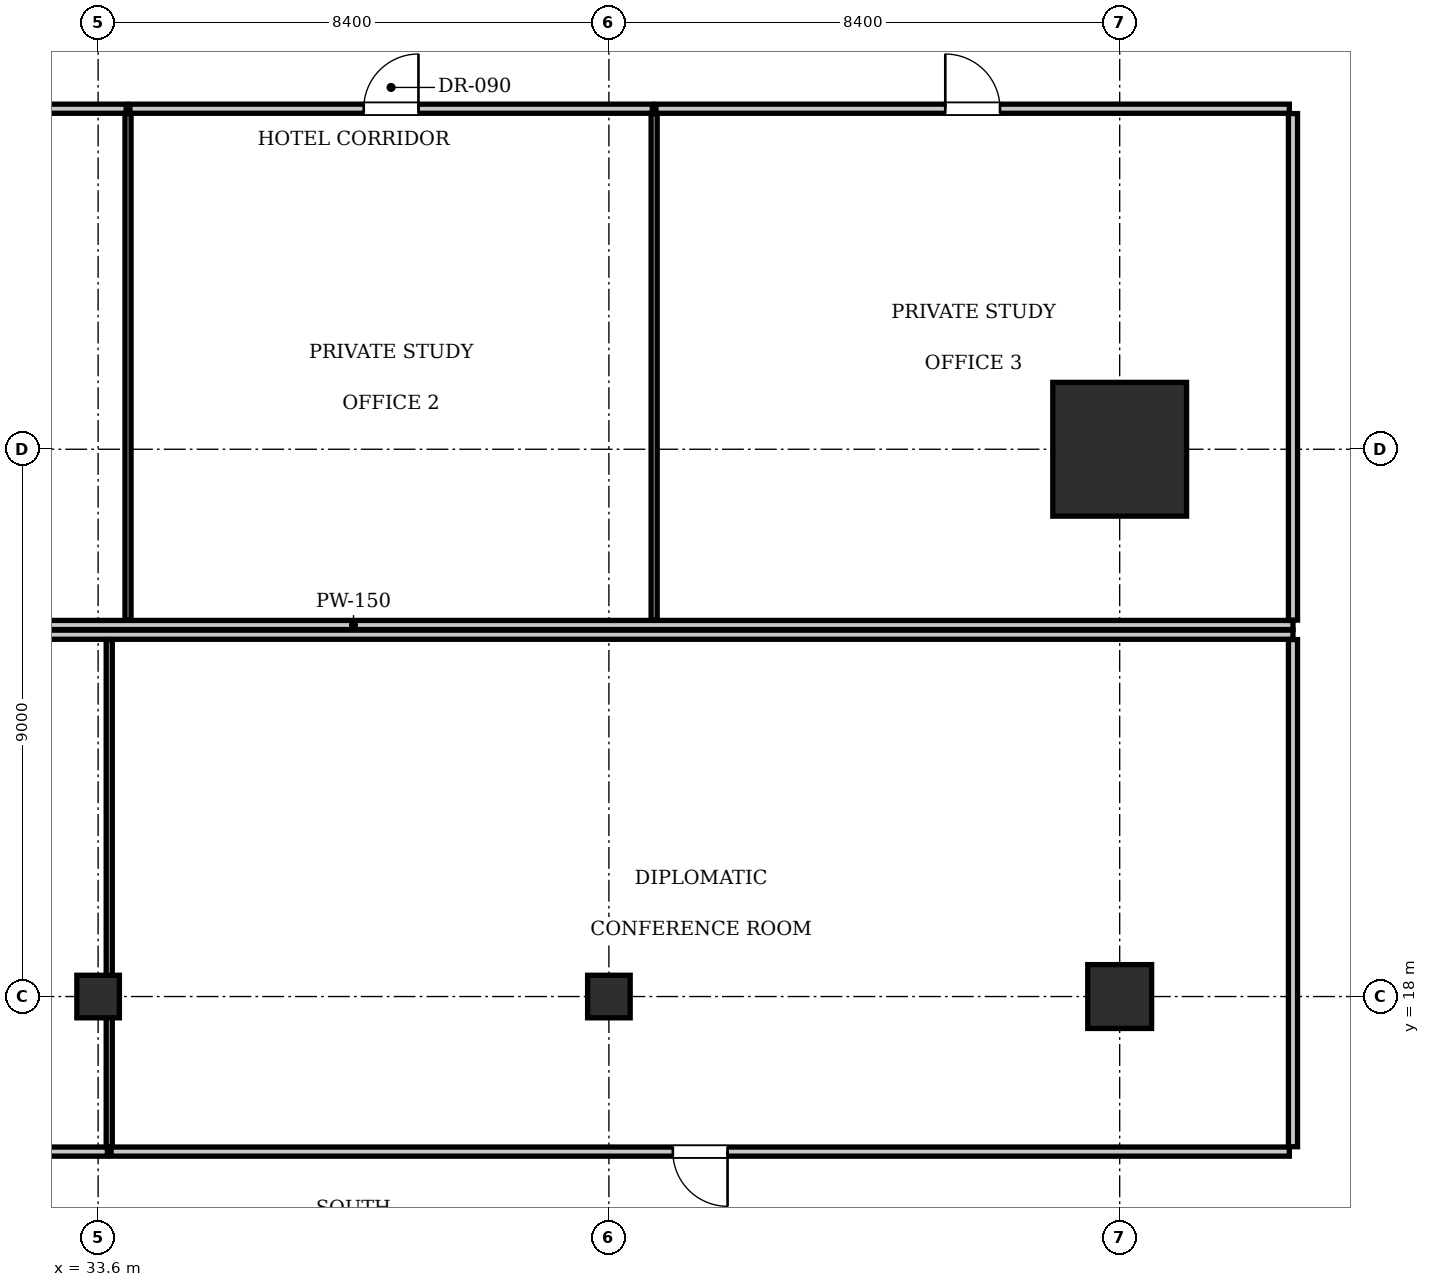
"""IFC4 building model, lengths in metres.
Left out: names, types, materials, properties, quantities, classifications, styles, units other than length and angle.
Written with IfcOpenShell. Run it as: python <this file> out.ifc"""

import sys

from ifc_helpers import new_model, si_unit, direction, frame, frame_2d, origin, origin_2d, place, context, subcontext, project, spatial, rectangle, i_section, extrude, element, fill, save


model = new_model("IFC4")
c1 = context("Model", 3, precision=1e-05, world=origin(), true_north=direction((0.0, 1.0)))
c2 = subcontext(c1, "Body", "Model", "MODEL_VIEW")
j1 = project(units=[si_unit("LENGTHUNIT", "METRE"), si_unit("PLANEANGLEUNIT", "RADIAN")], contexts=[c1])
p1 = place(None, origin())
s1 = spatial("IfcSite", under=j1, at=p1, CompositionType="ELEMENT")
p2 = place(p1, origin())
s2 = spatial("IfcBuilding", under=s1, at=p2, CompositionType="ELEMENT")
p3 = place(p2, frame((0.0, 0.0, 65.45)))
s3 = spatial("IfcBuildingStorey", under=s2, at=p3, CompositionType="ELEMENT", Elevation=65.45)
p4 = place(p3, frame((50.4, 27.0, 0.0), z_axis=(0.0, 0.0, 1.0), x_axis=(1.0, 0.0, 0.0)))
e1 = element("IfcColumn", 1, at=p4, inside=s3, PredefinedType="COLUMN", context=c2, shape_type="SweptSolid", body=[
    extrude(rectangle(XDim=2.2, YDim=2.2, at=origin_2d()), origin(), (0.0, 0.0, 1.0), 3.85),
])
p5 = place(p3, frame((50.4, 18.0, 0.0), z_axis=(0.0, 0.0, 1.0), x_axis=(1.0, 0.0, 0.0)))
e2 = element("IfcColumn", 2, at=p5, inside=s3, PredefinedType="COLUMN", context=c2, shape_type="SweptSolid", body=[
    extrude(rectangle(XDim=1.05, YDim=1.05, at=origin_2d()), origin(), (0.0, 0.0, 1.0), 3.85),
])
for number, where, z_axis, x_axis in (
    (3, (33.6, 18.0, 0.0), (0.0, 0.0, 1.0), (1.0, 0.0, 0.0)),
    (4, (42.0, 18.0, 0.0), (0.0, 0.0, 1.0), (1.0, 0.0, 0.0)),
):
    element("IfcColumn", number, at=place(p3, frame(where, z_axis=z_axis, x_axis=x_axis)), inside=s3, PredefinedType="COLUMN", context=c2, shape_type="SweptSolid", body=[
        extrude(i_section(OverallWidth=0.7, OverallDepth=0.7, WebThickness=0.028, FlangeThickness=0.044, at=origin_2d()), origin(), (0.0, 0.0, 1.0), 3.85),
    ])
p6 = place(p3, frame((22.35, 24.11, 0.0), z_axis=(0.0, 0.0, 1.0), x_axis=(1.0, 0.0, 0.0)))
e5 = element("IfcWall", 5, at=p6, inside=s3, PredefinedType="PARTITIONING", context=c2, shape_type="SweptSolid", body=[
    extrude(rectangle(XDim=30.9, YDim=0.15, at=frame_2d((15.45, 0.0))), origin(), (0.0, 0.0, 1.0), 3.61),
])
p7 = place(p3, frame((53.25, 24.19, 0.0), z_axis=(0.0, 0.0, 1.0), x_axis=(0.0, 1.0, 0.0)))
e6 = element("IfcWall", 6, at=p7, inside=s3, PredefinedType="PARTITIONING", context=c2, shape_type="SweptSolid", body=[
    extrude(rectangle(XDim=8.33, YDim=0.15, at=frame_2d((4.165, 0.0))), origin(), (0.0, 0.0, 1.0), 3.61),
])
p8 = place(p3, frame((27.324, 32.6, 0.0), z_axis=(0.0, 0.0, 1.0), x_axis=(1.0, 0.0, 0.0)))
e7 = element("IfcWall", 7, at=p8, inside=s3, PredefinedType="PARTITIONING", context=c2, shape_type="SweptSolid", body=[
    extrude(rectangle(XDim=6.738, YDim=0.15, at=frame_2d((3.369, 0.0))), origin(), (0.0, 0.0, 1.0), 3.61),
])
p9 = place(p8, frame((2.919, 0.0, 0.0)))
e8 = element("IfcOpeningElement", 8, at=p9, cuts=e7, PredefinedType="OPENING", context=c2, shape_type="SweptSolid", body=[
    extrude(rectangle(XDim=0.9, YDim=2.1, at=frame_2d((0.45, 1.05))), frame((0.0, 0.085, 0.0), z_axis=(0.0, -1.0, 0.0), x_axis=(1.0, 0.0, 0.0)), (0.0, 0.0, 1.0), 0.17),
])
p10 = place(p3, frame((34.092, 24.19, 0.0), z_axis=(0.0, 0.0, 1.0), x_axis=(0.0, 1.0, 0.0)))
e9 = element("IfcWall", 9, at=p10, inside=s3, PredefinedType="PARTITIONING", context=c2, shape_type="SweptSolid", body=[
    extrude(rectangle(XDim=8.33, YDim=0.1, at=frame_2d((4.165, 0.0))), origin(), (0.0, 0.0, 1.0), 3.61),
])
p11 = place(p3, frame((34.122, 32.6, 0.0), z_axis=(0.0, 0.0, 1.0), x_axis=(1.0, 0.0, 0.0)))
e10 = element("IfcWall", 10, at=p11, inside=s3, PredefinedType="PARTITIONING", context=c2, shape_type="SweptSolid", body=[
    extrude(rectangle(XDim=8.592, YDim=0.15, at=frame_2d((4.296, 0.0))), origin(), (0.0, 0.0, 1.0), 3.61),
])
p12 = place(p11, frame((3.846, 0.0, 0.0)))
e11 = element("IfcOpeningElement", 11, at=p12, cuts=e10, PredefinedType="OPENING", context=c2, shape_type="SweptSolid", body=[
    extrude(rectangle(XDim=0.9, YDim=2.1, at=frame_2d((0.45, 1.05))), frame((0.0, 0.085, 0.0), z_axis=(0.0, -1.0, 0.0), x_axis=(1.0, 0.0, 0.0)), (0.0, 0.0, 1.0), 0.17),
])
p13 = place(p3, frame((42.744, 24.19, 0.0), z_axis=(0.0, 0.0, 1.0), x_axis=(0.0, 1.0, 0.0)))
e12 = element("IfcWall", 12, at=p13, inside=s3, PredefinedType="PARTITIONING", context=c2, shape_type="SweptSolid", body=[
    extrude(rectangle(XDim=8.33, YDim=0.1, at=frame_2d((4.165, 0.0))), origin(), (0.0, 0.0, 1.0), 3.61),
])
p14 = place(p3, frame((42.774, 32.6, 0.0), z_axis=(0.0, 0.0, 1.0), x_axis=(1.0, 0.0, 0.0)))
e13 = element("IfcWall", 13, at=p14, inside=s3, PredefinedType="PARTITIONING", context=c2, shape_type="SweptSolid", body=[
    extrude(rectangle(XDim=10.416, YDim=0.15, at=frame_2d((5.208, 0.0))), origin(), (0.0, 0.0, 1.0), 3.61),
])
p15 = place(p14, frame((4.758, 0.0, 0.0)))
e14 = element("IfcOpeningElement", 14, at=p15, cuts=e13, PredefinedType="OPENING", context=c2, shape_type="SweptSolid", body=[
    extrude(rectangle(XDim=0.9, YDim=2.1, at=frame_2d((0.45, 1.05))), frame((0.0, 0.085, 0.0), z_axis=(0.0, -1.0, 0.0), x_axis=(1.0, 0.0, 0.0)), (0.0, 0.0, 1.0), 0.17),
])
p16 = place(p3, frame((22.35, 23.95, 0.0), z_axis=(0.0, 0.0, 1.0), x_axis=(1.0, 0.0, 0.0)))
e15 = element("IfcWall", 15, at=p16, inside=s3, PredefinedType="PARTITIONING", context=c2, shape_type="SweptSolid", body=[
    extrude(rectangle(XDim=30.9, YDim=0.15, at=frame_2d((15.45, 0.0))), origin(), (0.0, 0.0, 1.0), 3.61),
])
p17 = place(p3, frame((53.25, 15.53, 0.0), z_axis=(0.0, 0.0, 1.0), x_axis=(0.0, 1.0, 0.0)))
e16 = element("IfcWall", 16, at=p17, inside=s3, PredefinedType="PARTITIONING", context=c2, shape_type="SweptSolid", body=[
    extrude(rectangle(XDim=8.34, YDim=0.15, at=frame_2d((4.17, 0.0))), origin(), (0.0, 0.0, 1.0), 3.61),
])
p18 = place(p3, frame((22.41, 15.45, 0.0), z_axis=(0.0, 0.0, 1.0), x_axis=(1.0, 0.0, 0.0)))
e17 = element("IfcWall", 17, at=p18, inside=s3, PredefinedType="PARTITIONING", context=c2, shape_type="SweptSolid", body=[
    extrude(rectangle(XDim=11.343, YDim=0.15, at=frame_2d((5.671, 0.0))), origin(), (0.0, 0.0, 1.0), 3.61),
])
p19 = place(p18, frame((5.221, 0.0, 0.0)))
e18 = element("IfcOpeningElement", 18, at=p19, cuts=e17, PredefinedType="OPENING", context=c2, shape_type="SweptSolid", body=[
    extrude(rectangle(XDim=0.9, YDim=2.1, at=frame_2d((0.45, 1.05))), frame((0.0, 0.085, 0.0), z_axis=(0.0, -1.0, 0.0), x_axis=(1.0, 0.0, 0.0)), (0.0, 0.0, 1.0), 0.17),
])
p20 = place(p3, frame((33.783, 15.53, 0.0), z_axis=(0.0, 0.0, 1.0), x_axis=(0.0, 1.0, 0.0)))
e19 = element("IfcWall", 19, at=p20, inside=s3, PredefinedType="PARTITIONING", context=c2, shape_type="SweptSolid", body=[
    extrude(rectangle(XDim=8.34, YDim=0.1, at=frame_2d((4.17, 0.0))), origin(), (0.0, 0.0, 1.0), 2.988),
])
p21 = place(p3, frame((33.813, 15.45, 0.0), z_axis=(0.0, 0.0, 1.0), x_axis=(1.0, 0.0, 0.0)))
e20 = element("IfcWall", 20, at=p21, inside=s3, PredefinedType="PARTITIONING", context=c2, shape_type="SweptSolid", body=[
    extrude(rectangle(XDim=19.377, YDim=0.15, at=frame_2d((9.688, 0.0))), origin(), (0.0, 0.0, 1.0), 3.61),
])
p22 = place(p21, frame((9.239, 0.0, 0.0)))
e21 = element("IfcOpeningElement", 21, at=p22, cuts=e20, PredefinedType="OPENING", context=c2, shape_type="SweptSolid", body=[
    extrude(rectangle(XDim=0.9, YDim=2.1, at=frame_2d((0.45, 1.05))), frame((0.0, 0.085, 0.0), z_axis=(0.0, -1.0, 0.0), x_axis=(1.0, 0.0, 0.0)), (0.0, 0.0, 1.0), 0.17),
])
p23 = place(p12, origin())
e22 = element("IfcDoor", 22, at=p23, inside=s3, OperationType="SINGLE_SWING_RIGHT", PredefinedType="DOOR", context=c2, shape_type="SweptSolid", body=[
    extrude(rectangle(XDim=0.9, YDim=2.1, at=frame_2d((0.45, 1.05))), frame((0.0, 0.025, 0.0), z_axis=(0.0, -1.0, 0.0), x_axis=(1.0, 0.0, 0.0)), (0.0, 0.0, 1.0), 0.05),
])
fill(e11, e22)
p24 = place(p15, origin())
e23 = element("IfcDoor", 23, at=p24, inside=s3, OperationType="SINGLE_SWING_LEFT", PredefinedType="DOOR", context=c2, shape_type="SweptSolid", body=[
    extrude(rectangle(XDim=0.9, YDim=2.1, at=frame_2d((0.45, 1.05))), frame((0.0, 0.025, 0.0), z_axis=(0.0, -1.0, 0.0), x_axis=(1.0, 0.0, 0.0)), (0.0, 0.0, 1.0), 0.05),
])
fill(e14, e23)
p25 = place(p22, frame((0.9, 0.0, 0.0), z_axis=(0.0, 0.0, 1.0), x_axis=(-1.0, 0.0, 0.0)))
e24 = element("IfcDoor", 24, at=p25, inside=s3, OperationType="SINGLE_SWING_LEFT", PredefinedType="DOOR", context=c2, shape_type="SweptSolid", body=[
    extrude(rectangle(XDim=0.9, YDim=2.1, at=frame_2d((0.45, 1.05))), frame((0.0, 0.025, 0.0), z_axis=(0.0, -1.0, 0.0), x_axis=(1.0, 0.0, 0.0)), (0.0, 0.0, 1.0), 0.05),
])
fill(e21, e24)
save(model, sys.argv[1])
